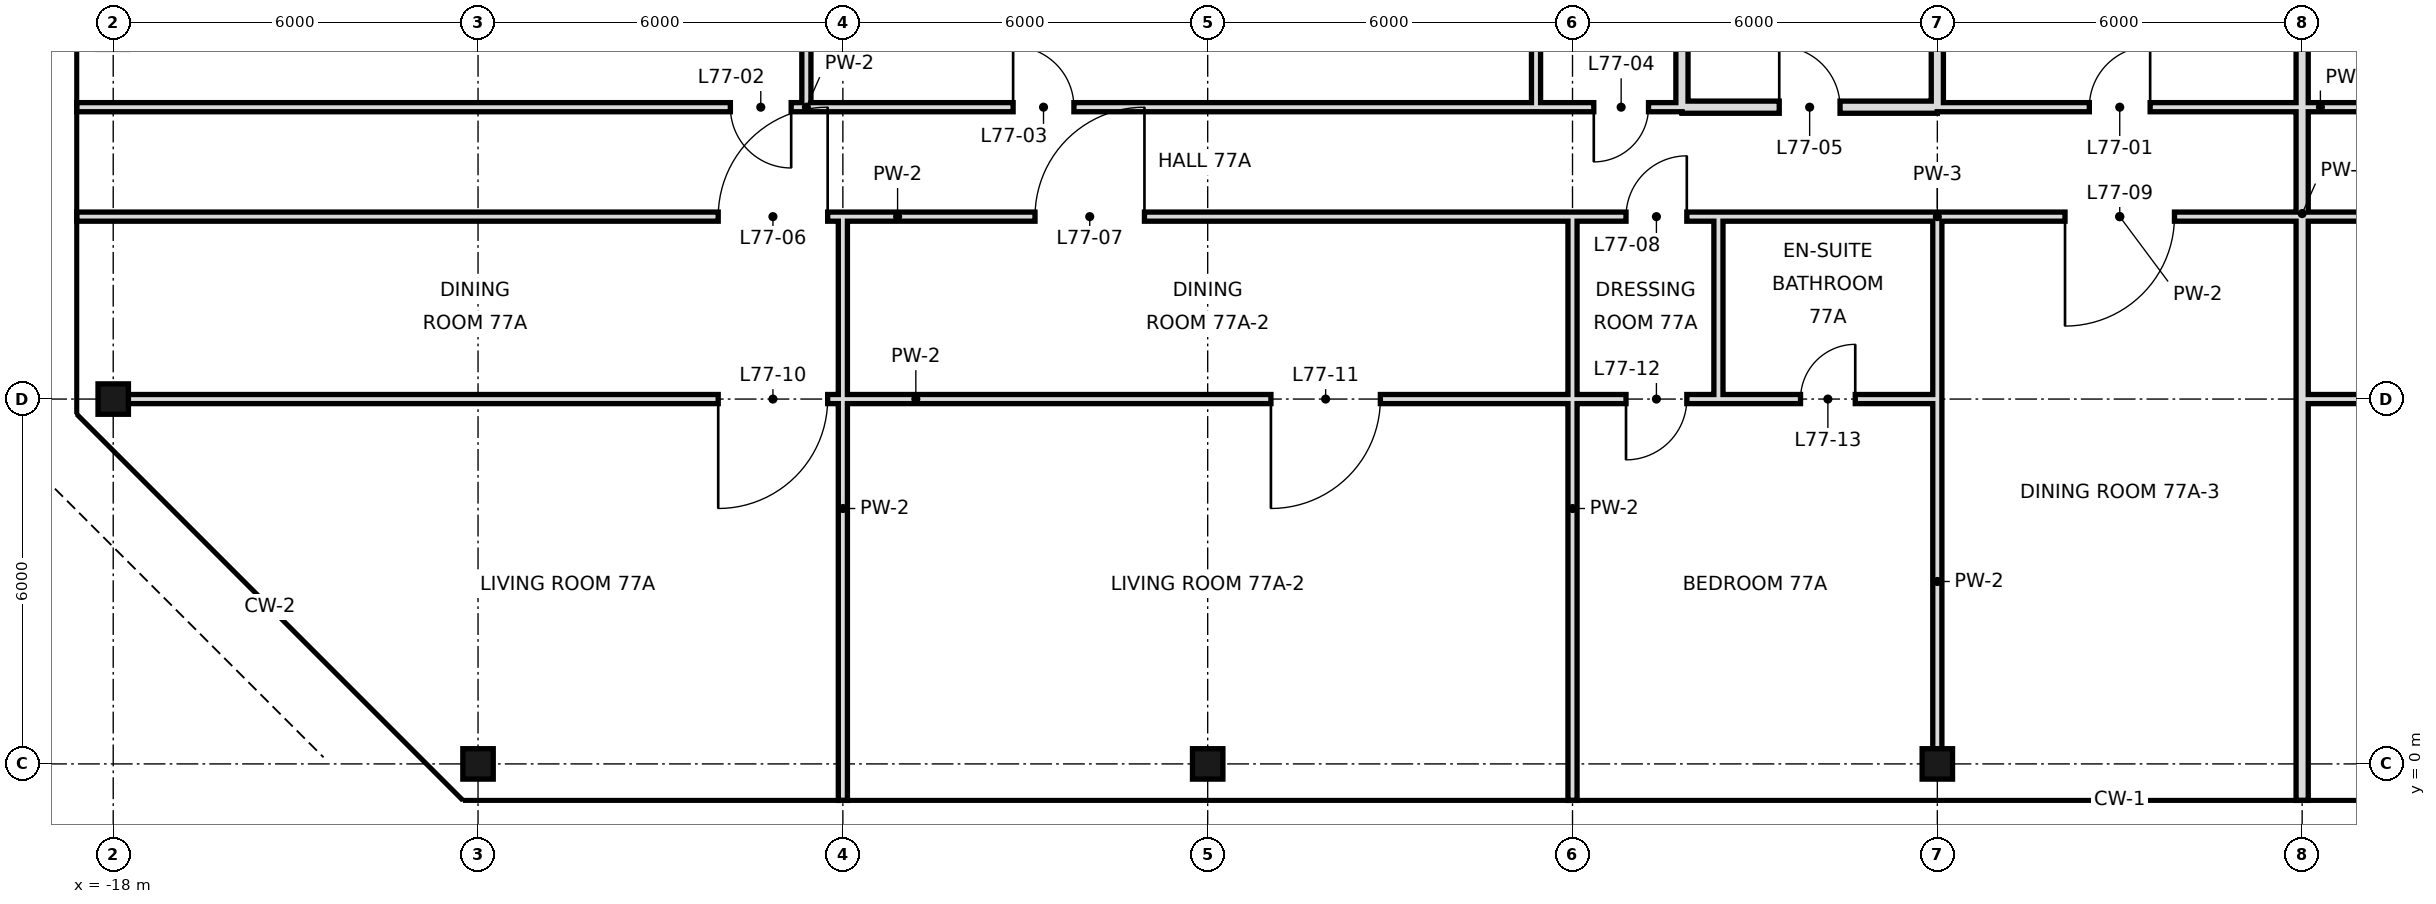
"""IFC4 building model, lengths in metres.
Left out: names, types, materials, properties, quantities, classifications, styles, units other than length and angle.
Written with IfcOpenShell. Run it as: python <this file> out.ifc"""

import sys

from ifc_helpers import new_model, si_unit, direction, frame, frame_2d, origin, origin_2d, place, context, subcontext, project, spatial, rectangle, hollow_rectangle, extrude, element, fill, save


model = new_model("IFC4")
c1 = context("Model", 3, precision=1e-05, world=origin(), true_north=direction((0.0, 1.0)))
c2 = subcontext(c1, "Body", "Model", "MODEL_VIEW")
j1 = project(units=[si_unit("LENGTHUNIT", "METRE"), si_unit("PLANEANGLEUNIT", "RADIAN")], contexts=[c1])
p1 = place(None, origin())
s1 = spatial("IfcSite", under=j1, at=p1, CompositionType="ELEMENT")
p2 = place(p1, origin())
s2 = spatial("IfcBuilding", under=s1, at=p2, CompositionType="ELEMENT")
p3 = place(p2, frame((0.0, 0.0, 323.2)))
s3 = spatial("IfcBuildingStorey", under=s2, at=p3, CompositionType="ELEMENT", Elevation=323.2)
for number, where, z_axis, x_axis in (
    (1, (-18.0, 6.0, 0.0), (0.0, 0.0, 1.0), (1.0, 0.0, 0.0)),
    (2, (-12.0, 0.0, 0.0), (0.0, 0.0, 1.0), (1.0, 0.0, 0.0)),
    (3, (0.0, 0.0, 0.0), (0.0, 0.0, 1.0), (1.0, 0.0, 0.0)),
    (4, (12.0, 0.0, 0.0), (0.0, 0.0, 1.0), (1.0, 0.0, 0.0)),
):
    element("IfcColumn", number, at=place(p3, frame(where, z_axis=z_axis, x_axis=x_axis)), inside=s3, PredefinedType="COLUMN", context=c2, shape_type="SweptSolid", body=[
        extrude(hollow_rectangle(XDim=0.5, YDim=0.5, WallThickness=0.025, at=origin_2d()), origin(), (0.0, 0.0, 1.0), 3.6),
    ])
p4 = place(p3, frame((-6.0, -0.6, 0.0), z_axis=(0.0, 0.0, 1.0), x_axis=(0.0, 1.0, 0.0)))
e5 = element("IfcWall", 5, at=p4, inside=s3, PredefinedType="PARTITIONING", context=c2, shape_type="SweptSolid", body=[
    extrude(rectangle(XDim=9.6, YDim=0.15, at=frame_2d((4.8, 0.0))), origin(), (0.0, 0.0, 1.0), 3.42),
])
p5 = place(p3, frame((-6.6, 10.8, 0.0), z_axis=(0.0, 0.0, 1.0), x_axis=(0.0, 1.0, 0.0)))
e6 = element("IfcWall", 6, at=p5, inside=s3, PredefinedType="PARTITIONING", context=c2, shape_type="SweptSolid", body=[
    extrude(rectangle(XDim=7.2, YDim=0.15, at=frame_2d((3.6, 0.0))), origin(), (0.0, 0.0, 1.0), 3.42),
])
p6 = place(p3, frame((12.0, 10.8, 0.0), z_axis=(0.0, 0.0, 1.0), x_axis=(0.0, 1.0, 0.0)))
e7 = element("IfcWall", 7, at=p6, inside=s3, PredefinedType="SOLIDWALL", context=c2, shape_type="SweptSolid", body=[
    extrude(rectangle(XDim=7.9, YDim=0.2, at=frame_2d((3.95, 0.0))), origin(), (0.0, 0.0, 1.0), 2.72),
])
p7 = place(p3, frame((12.0, 0.0, 0.0), z_axis=(0.0, 0.0, 1.0), x_axis=(0.0, 1.0, 0.0)))
e8 = element("IfcWall", 8, at=p7, inside=s3, PredefinedType="PARTITIONING", context=c2, shape_type="SweptSolid", body=[
    extrude(rectangle(XDim=6.0, YDim=0.15, at=frame_2d((3.0, 0.0))), origin(), (0.0, 0.0, 1.0), 2.72),
])
p8 = place(p3, frame((12.0, 6.0, 0.0), z_axis=(0.0, 0.0, 1.0), x_axis=(0.0, 1.0, 0.0)))
e9 = element("IfcWall", 9, at=p8, inside=s3, PredefinedType="PARTITIONING", context=c2, shape_type="SweptSolid", body=[
    extrude(rectangle(XDim=3.0, YDim=0.15, at=frame_2d((1.5, 0.0))), origin(), (0.0, 0.0, 1.0), 2.72),
])
p9 = place(p3, frame((18.0, -0.6, 0.0), z_axis=(0.0, 0.0, 1.0), x_axis=(0.0, 1.0, 0.0)))
e10 = element("IfcWall", 10, at=p9, inside=s3, PredefinedType="SOLIDWALL", context=c2, shape_type="SweptSolid", body=[
    extrude(rectangle(XDim=19.3, YDim=0.2, at=frame_2d((9.65, 0.0))), origin(), (0.0, 0.0, 1.0), 2.72),
])
p10 = place(p3, frame((5.4, 10.8, 0.0), z_axis=(0.0, 0.0, 1.0), x_axis=(0.0, 1.0, 0.0)))
e11 = element("IfcWall", 11, at=p10, inside=s3, PredefinedType="PARTITIONING", context=c2, shape_type="SweptSolid", body=[
    extrude(rectangle(XDim=7.9, YDim=0.15, at=frame_2d((3.95, 0.0))), origin(), (0.0, 0.0, 1.0), 3.42),
])
p11 = place(p3, frame((6.0, -0.6, 0.0), z_axis=(0.0, 0.0, 1.0), x_axis=(0.0, 1.0, 0.0)))
e12 = element("IfcWall", 12, at=p11, inside=s3, PredefinedType="PARTITIONING", context=c2, shape_type="SweptSolid", body=[
    extrude(rectangle(XDim=9.6, YDim=0.15, at=frame_2d((4.8, 0.0))), origin(), (0.0, 0.0, 1.0), 2.72),
])
p12 = place(p3, frame((7.8, 10.8, 0.0), z_axis=(0.0, 0.0, 1.0), x_axis=(0.0, 1.0, 0.0)))
e13 = element("IfcWall", 13, at=p12, inside=s3, PredefinedType="SOLIDWALL", context=c2, shape_type="SweptSolid", body=[
    extrude(rectangle(XDim=7.9, YDim=0.2, at=frame_2d((3.95, 0.0))), origin(), (0.0, 0.0, 1.0), 2.72),
])
p13 = place(p3, frame((8.4, 6.0, 0.0), z_axis=(0.0, 0.0, 1.0), x_axis=(0.0, 1.0, 0.0)))
e14 = element("IfcWall", 14, at=p13, inside=s3, PredefinedType="PARTITIONING", context=c2, shape_type="SweptSolid", body=[
    extrude(rectangle(XDim=3.0, YDim=0.15, at=frame_2d((1.5, 0.0))), origin(), (0.0, 0.0, 1.0), 3.42),
])
p14 = place(p3, frame((7.8, 10.8, 0.0), z_axis=(0.0, 0.0, 1.0), x_axis=(1.0, 0.0, 0.0)))
e15 = element("IfcWall", 15, at=p14, inside=s3, PredefinedType="SOLIDWALL", context=c2, shape_type="SweptSolid", body=[
    extrude(rectangle(XDim=4.2, YDim=0.2, at=frame_2d((2.1, 0.0))), origin(), (0.0, 0.0, 1.0), 2.72),
])
p15 = place(p14, frame((1.6, 0.0, 0.0)))
e16 = element("IfcOpeningElement", 16, at=p15, cuts=e15, PredefinedType="OPENING", context=c2, shape_type="SweptSolid", body=[
    extrude(rectangle(XDim=1.0, YDim=2.4, at=frame_2d((0.5, 1.2))), frame((0.0, 0.11, 0.0), z_axis=(0.0, -1.0, 0.0), x_axis=(1.0, 0.0, 0.0)), (0.0, 0.0, 1.0), 0.22),
])
p16 = place(p3, frame((-18.6, 10.8, 0.0), z_axis=(0.0, 0.0, 1.0), x_axis=(1.0, 0.0, 0.0)))
e17 = element("IfcWall", 17, at=p16, inside=s3, PredefinedType="PARTITIONING", context=c2, shape_type="SweptSolid", body=[
    extrude(rectangle(XDim=24.0, YDim=0.15, at=frame_2d((12.0, 0.0))), origin(), (0.0, 0.0, 1.0), 3.42),
])
p17 = place(p16, frame((10.75, 0.0, 0.0)))
e18 = element("IfcOpeningElement", 18, at=p17, cuts=e17, PredefinedType="OPENING", context=c2, shape_type="SweptSolid", body=[
    extrude(rectangle(XDim=1.0, YDim=2.4, at=frame_2d((0.5, 1.2))), frame((0.0, 0.085, 0.0), z_axis=(0.0, -1.0, 0.0), x_axis=(1.0, 0.0, 0.0)), (0.0, 0.0, 1.0), 0.17),
])
p18 = place(p16, frame((15.4, 0.0, 0.0)))
e19 = element("IfcOpeningElement", 19, at=p18, cuts=e17, PredefinedType="OPENING", context=c2, shape_type="SweptSolid", body=[
    extrude(rectangle(XDim=1.0, YDim=2.4, at=frame_2d((0.5, 1.2))), frame((0.0, 0.085, 0.0), z_axis=(0.0, -1.0, 0.0), x_axis=(1.0, 0.0, 0.0)), (0.0, 0.0, 1.0), 0.17),
])
p19 = place(p3, frame((12.0, 10.8, 0.0), z_axis=(0.0, 0.0, 1.0), x_axis=(1.0, 0.0, 0.0)))
e20 = element("IfcWall", 20, at=p19, inside=s3, PredefinedType="PARTITIONING", context=c2, shape_type="SweptSolid", body=[
    extrude(rectangle(XDim=12.6, YDim=0.15, at=frame_2d((6.3, 0.0))), origin(), (0.0, 0.0, 1.0), 3.42),
])
p20 = place(p19, frame((2.5, 0.0, 0.0)))
e21 = element("IfcOpeningElement", 21, at=p20, cuts=e20, PredefinedType="OPENING", context=c2, shape_type="SweptSolid", body=[
    extrude(rectangle(XDim=1.0, YDim=2.4, at=frame_2d((0.5, 1.2))), frame((0.0, 0.085, 0.0), z_axis=(0.0, -1.0, 0.0), x_axis=(1.0, 0.0, 0.0)), (0.0, 0.0, 1.0), 0.17),
])
p21 = place(p19, frame((9.82, 0.0, 0.0)))
e22 = element("IfcOpeningElement", 22, at=p21, cuts=e20, PredefinedType="OPENING", context=c2, shape_type="SweptSolid", body=[
    extrude(rectangle(XDim=1.0, YDim=2.4, at=frame_2d((0.5, 1.2))), frame((0.0, 0.085, 0.0), z_axis=(0.0, -1.0, 0.0), x_axis=(1.0, 0.0, 0.0)), (0.0, 0.0, 1.0), 0.17),
])
p22 = place(p3, frame((5.4, 10.8, 0.0), z_axis=(0.0, 0.0, 1.0), x_axis=(1.0, 0.0, 0.0)))
e23 = element("IfcWall", 23, at=p22, inside=s3, PredefinedType="PARTITIONING", context=c2, shape_type="SweptSolid", body=[
    extrude(rectangle(XDim=2.4, YDim=0.15, at=frame_2d((1.2, 0.0))), origin(), (0.0, 0.0, 1.0), 3.42),
])
p23 = place(p22, frame((0.95, 0.0, 0.0)))
e24 = element("IfcOpeningElement", 24, at=p23, cuts=e23, PredefinedType="OPENING", context=c2, shape_type="SweptSolid", body=[
    extrude(rectangle(XDim=0.9, YDim=2.4, at=frame_2d((0.45, 1.2))), frame((0.0, 0.085, 0.0), z_axis=(0.0, -1.0, 0.0), x_axis=(1.0, 0.0, 0.0)), (0.0, 0.0, 1.0), 0.17),
])
p24 = place(p3, frame((-18.0, 6.0, 0.0), z_axis=(0.0, 0.0, 1.0), x_axis=(1.0, 0.0, 0.0)))
e25 = element("IfcWall", 25, at=p24, inside=s3, PredefinedType="PARTITIONING", context=c2, shape_type="SweptSolid", body=[
    extrude(rectangle(XDim=26.4, YDim=0.15, at=frame_2d((13.2, 0.0))), origin(), (0.0, 0.0, 1.0), 2.72),
])
p25 = place(p24, frame((9.95, 0.0, 0.0)))
e26 = element("IfcOpeningElement", 26, at=p25, cuts=e25, PredefinedType="OPENING", context=c2, shape_type="SweptSolid", body=[
    extrude(rectangle(XDim=1.8, YDim=2.4, at=frame_2d((0.9, 1.2))), frame((0.0, 0.085, 0.0), z_axis=(0.0, -1.0, 0.0), x_axis=(1.0, 0.0, 0.0)), (0.0, 0.0, 1.0), 0.17),
])
p26 = place(p24, frame((19.04, 0.0, 0.0)))
e27 = element("IfcOpeningElement", 27, at=p26, cuts=e25, PredefinedType="OPENING", context=c2, shape_type="SweptSolid", body=[
    extrude(rectangle(XDim=1.8, YDim=2.4, at=frame_2d((0.9, 1.2))), frame((0.0, 0.085, 0.0), z_axis=(0.0, -1.0, 0.0), x_axis=(1.0, 0.0, 0.0)), (0.0, 0.0, 1.0), 0.17),
])
p27 = place(p24, frame((24.88, 0.0, 0.0)))
e28 = element("IfcOpeningElement", 28, at=p27, cuts=e25, PredefinedType="OPENING", context=c2, shape_type="SweptSolid", body=[
    extrude(rectangle(XDim=1.0, YDim=2.4, at=frame_2d((0.5, 1.2))), frame((0.0, 0.085, 0.0), z_axis=(0.0, -1.0, 0.0), x_axis=(1.0, 0.0, 0.0)), (0.0, 0.0, 1.0), 0.17),
])
p28 = place(p3, frame((8.4, 6.0, 0.0), z_axis=(0.0, 0.0, 1.0), x_axis=(1.0, 0.0, 0.0)))
e29 = element("IfcWall", 29, at=p28, inside=s3, PredefinedType="PARTITIONING", context=c2, shape_type="SweptSolid", body=[
    extrude(rectangle(XDim=3.6, YDim=0.15, at=frame_2d((1.8, 0.0))), origin(), (0.0, 0.0, 1.0), 2.97),
])
p29 = place(p28, frame((1.35, 0.0, 0.0)))
e30 = element("IfcOpeningElement", 30, at=p29, cuts=e29, PredefinedType="OPENING", context=c2, shape_type="SweptSolid", body=[
    extrude(rectangle(XDim=0.9, YDim=2.4, at=frame_2d((0.45, 1.2))), frame((0.0, 0.085, 0.0), z_axis=(0.0, -1.0, 0.0), x_axis=(1.0, 0.0, 0.0)), (0.0, 0.0, 1.0), 0.17),
])
p30 = place(p3, frame((18.0, 6.0, 0.0), z_axis=(0.0, 0.0, 1.0), x_axis=(1.0, 0.0, 0.0)))
e31 = element("IfcWall", 31, at=p30, inside=s3, PredefinedType="PARTITIONING", context=c2, shape_type="SweptSolid", body=[
    extrude(rectangle(XDim=8.4, YDim=0.15, at=frame_2d((4.2, 0.0))), origin(), (0.0, 0.0, 1.0), 2.97),
])
p31 = place(p30, frame((7.25, 0.0, 0.0)))
e32 = element("IfcOpeningElement", 32, at=p31, cuts=e31, PredefinedType="OPENING", context=c2, shape_type="SweptSolid", body=[
    extrude(rectangle(XDim=0.9, YDim=2.4, at=frame_2d((0.45, 1.2))), frame((0.0, 0.085, 0.0), z_axis=(0.0, -1.0, 0.0), x_axis=(1.0, 0.0, 0.0)), (0.0, 0.0, 1.0), 0.17),
])
p32 = place(p3, frame((-18.6, 9.0, 0.0), z_axis=(0.0, 0.0, 1.0), x_axis=(1.0, 0.0, 0.0)))
e33 = element("IfcWall", 33, at=p32, inside=s3, PredefinedType="PARTITIONING", context=c2, shape_type="SweptSolid", body=[
    extrude(rectangle(XDim=27.0, YDim=0.15, at=frame_2d((13.5, 0.0))), origin(), (0.0, 0.0, 1.0), 3.42),
])
p33 = place(p32, frame((10.55, 0.0, 0.0)))
e34 = element("IfcOpeningElement", 34, at=p33, cuts=e33, PredefinedType="OPENING", context=c2, shape_type="SweptSolid", body=[
    extrude(rectangle(XDim=1.8, YDim=2.4, at=frame_2d((0.9, 1.2))), frame((0.0, 0.085, 0.0), z_axis=(0.0, -1.0, 0.0), x_axis=(1.0, 0.0, 0.0)), (0.0, 0.0, 1.0), 0.17),
])
p34 = place(p32, frame((15.76, 0.0, 0.0)))
e35 = element("IfcOpeningElement", 35, at=p34, cuts=e33, PredefinedType="OPENING", context=c2, shape_type="SweptSolid", body=[
    extrude(rectangle(XDim=1.8, YDim=2.4, at=frame_2d((0.9, 1.2))), frame((0.0, 0.085, 0.0), z_axis=(0.0, -1.0, 0.0), x_axis=(1.0, 0.0, 0.0)), (0.0, 0.0, 1.0), 0.17),
])
p35 = place(p32, frame((25.48, 0.0, 0.0)))
e36 = element("IfcOpeningElement", 36, at=p35, cuts=e33, PredefinedType="OPENING", context=c2, shape_type="SweptSolid", body=[
    extrude(rectangle(XDim=1.0, YDim=2.4, at=frame_2d((0.5, 1.2))), frame((0.0, 0.085, 0.0), z_axis=(0.0, -1.0, 0.0), x_axis=(1.0, 0.0, 0.0)), (0.0, 0.0, 1.0), 0.17),
])
p36 = place(p3, frame((12.0, 9.0, 0.0), z_axis=(0.0, 0.0, 1.0), x_axis=(1.0, 0.0, 0.0)))
e37 = element("IfcWall", 37, at=p36, inside=s3, PredefinedType="PARTITIONING", context=c2, shape_type="SweptSolid", body=[
    extrude(rectangle(XDim=6.0, YDim=0.15, at=frame_2d((3.0, 0.0))), origin(), (0.0, 0.0, 1.0), 3.42),
])
p37 = place(p36, frame((2.1, 0.0, 0.0)))
e38 = element("IfcOpeningElement", 38, at=p37, cuts=e37, PredefinedType="OPENING", context=c2, shape_type="SweptSolid", body=[
    extrude(rectangle(XDim=1.8, YDim=2.4, at=frame_2d((0.9, 1.2))), frame((0.0, 0.085, 0.0), z_axis=(0.0, -1.0, 0.0), x_axis=(1.0, 0.0, 0.0)), (0.0, 0.0, 1.0), 0.17),
])
p38 = place(p3, frame((8.4, 9.0, 0.0), z_axis=(0.0, 0.0, 1.0), x_axis=(1.0, 0.0, 0.0)))
e39 = element("IfcWall", 39, at=p38, inside=s3, PredefinedType="PARTITIONING", context=c2, shape_type="SweptSolid", body=[
    extrude(rectangle(XDim=3.6, YDim=0.15, at=frame_2d((1.8, 0.0))), origin(), (0.0, 0.0, 1.0), 3.42),
])
p39 = place(p3, frame((18.0, 9.0, 0.0), z_axis=(0.0, 0.0, 1.0), x_axis=(1.0, 0.0, 0.0)))
e40 = element("IfcWall", 40, at=p39, inside=s3, PredefinedType="PARTITIONING", context=c2, shape_type="SweptSolid", body=[
    extrude(rectangle(XDim=8.4, YDim=0.15, at=frame_2d((4.2, 0.0))), origin(), (0.0, 0.0, 1.0), 3.42),
])
p40 = place(p20, frame((1.0, 0.0, 0.0), z_axis=(0.0, 0.0, 1.0), x_axis=(-1.0, 0.0, 0.0)))
e41 = element("IfcDoor", 41, at=p40, inside=s3, OperationType="SINGLE_SWING_LEFT", PredefinedType="DOOR", context=c2, shape_type="SweptSolid", body=[
    extrude(rectangle(XDim=1.0, YDim=2.4, at=frame_2d((0.5, 1.2))), frame((0.0, 0.025, 0.0), z_axis=(0.0, -1.0, 0.0), x_axis=(1.0, 0.0, 0.0)), (0.0, 0.0, 1.0), 0.05),
])
fill(e21, e41)
p41 = place(p17, origin())
e42 = element("IfcDoor", 42, at=p41, inside=s3, OperationType="SINGLE_SWING_RIGHT", PredefinedType="DOOR", context=c2, shape_type="SweptSolid", body=[
    extrude(rectangle(XDim=1.0, YDim=2.4, at=frame_2d((0.5, 1.2))), frame((0.0, 0.025, 0.0), z_axis=(0.0, -1.0, 0.0), x_axis=(1.0, 0.0, 0.0)), (0.0, 0.0, 1.0), 0.05),
])
fill(e18, e42)
p42 = place(p18, origin())
e43 = element("IfcDoor", 43, at=p42, inside=s3, OperationType="SINGLE_SWING_LEFT", PredefinedType="DOOR", context=c2, shape_type="SweptSolid", body=[
    extrude(rectangle(XDim=1.0, YDim=2.4, at=frame_2d((0.5, 1.2))), frame((0.0, 0.025, 0.0), z_axis=(0.0, -1.0, 0.0), x_axis=(1.0, 0.0, 0.0)), (0.0, 0.0, 1.0), 0.05),
])
fill(e19, e43)
p43 = place(p23, frame((0.9, 0.0, 0.0), z_axis=(0.0, 0.0, 1.0), x_axis=(-1.0, 0.0, 0.0)))
e44 = element("IfcDoor", 44, at=p43, inside=s3, OperationType="SINGLE_SWING_RIGHT", PredefinedType="DOOR", context=c2, shape_type="SweptSolid", body=[
    extrude(rectangle(XDim=0.9, YDim=2.4, at=frame_2d((0.45, 1.2))), frame((0.0, 0.025, 0.0), z_axis=(0.0, -1.0, 0.0), x_axis=(1.0, 0.0, 0.0)), (0.0, 0.0, 1.0), 0.05),
])
fill(e24, e44)
p44 = place(p15, origin())
e45 = element("IfcDoor", 45, at=p44, inside=s3, OperationType="SINGLE_SWING_LEFT", PredefinedType="DOOR", context=c2, shape_type="SweptSolid", body=[
    extrude(rectangle(XDim=1.0, YDim=2.4, at=frame_2d((0.5, 1.2))), frame((0.0, 0.025, 0.0), z_axis=(0.0, -1.0, 0.0), x_axis=(1.0, 0.0, 0.0)), (0.0, 0.0, 1.0), 0.05),
])
fill(e16, e45)
p45 = place(p33, frame((1.8, 0.0, 0.0), z_axis=(0.0, 0.0, 1.0), x_axis=(-1.0, 0.0, 0.0)))
e46 = element("IfcDoor", 46, at=p45, inside=s3, OperationType="SINGLE_SWING_LEFT", PredefinedType="DOOR", context=c2, shape_type="SweptSolid", body=[
    extrude(rectangle(XDim=1.8, YDim=2.4, at=frame_2d((0.9, 1.2))), frame((0.0, 0.025, 0.0), z_axis=(0.0, -1.0, 0.0), x_axis=(1.0, 0.0, 0.0)), (0.0, 0.0, 1.0), 0.05),
])
fill(e34, e46)
p46 = place(p34, frame((1.8, 0.0, 0.0), z_axis=(0.0, 0.0, 1.0), x_axis=(-1.0, 0.0, 0.0)))
e47 = element("IfcDoor", 47, at=p46, inside=s3, OperationType="SINGLE_SWING_LEFT", PredefinedType="DOOR", context=c2, shape_type="SweptSolid", body=[
    extrude(rectangle(XDim=1.8, YDim=2.4, at=frame_2d((0.9, 1.2))), frame((0.0, 0.025, 0.0), z_axis=(0.0, -1.0, 0.0), x_axis=(1.0, 0.0, 0.0)), (0.0, 0.0, 1.0), 0.05),
])
fill(e35, e47)
p47 = place(p35, frame((1.0, 0.0, 0.0), z_axis=(0.0, 0.0, 1.0), x_axis=(-1.0, 0.0, 0.0)))
e48 = element("IfcDoor", 48, at=p47, inside=s3, OperationType="SINGLE_SWING_LEFT", PredefinedType="DOOR", context=c2, shape_type="SweptSolid", body=[
    extrude(rectangle(XDim=1.0, YDim=2.4, at=frame_2d((0.5, 1.2))), frame((0.0, 0.025, 0.0), z_axis=(0.0, -1.0, 0.0), x_axis=(1.0, 0.0, 0.0)), (0.0, 0.0, 1.0), 0.05),
])
fill(e36, e48)
p48 = place(p37, frame((1.8, 0.0, 0.0), z_axis=(0.0, 0.0, 1.0), x_axis=(-1.0, 0.0, 0.0)))
e49 = element("IfcDoor", 49, at=p48, inside=s3, OperationType="SINGLE_SWING_RIGHT", PredefinedType="DOOR", context=c2, shape_type="SweptSolid", body=[
    extrude(rectangle(XDim=1.8, YDim=2.4, at=frame_2d((0.9, 1.2))), frame((0.0, 0.025, 0.0), z_axis=(0.0, -1.0, 0.0), x_axis=(1.0, 0.0, 0.0)), (0.0, 0.0, 1.0), 0.05),
])
fill(e38, e49)
p49 = place(p25, frame((1.8, 0.0, 0.0), z_axis=(0.0, 0.0, 1.0), x_axis=(-1.0, 0.0, 0.0)))
e50 = element("IfcDoor", 50, at=p49, inside=s3, OperationType="SINGLE_SWING_RIGHT", PredefinedType="DOOR", context=c2, shape_type="SweptSolid", body=[
    extrude(rectangle(XDim=1.8, YDim=2.4, at=frame_2d((0.9, 1.2))), frame((0.0, 0.025, 0.0), z_axis=(0.0, -1.0, 0.0), x_axis=(1.0, 0.0, 0.0)), (0.0, 0.0, 1.0), 0.05),
])
fill(e26, e50)
p50 = place(p26, frame((1.8, 0.0, 0.0), z_axis=(0.0, 0.0, 1.0), x_axis=(-1.0, 0.0, 0.0)))
e51 = element("IfcDoor", 51, at=p50, inside=s3, OperationType="SINGLE_SWING_RIGHT", PredefinedType="DOOR", context=c2, shape_type="SweptSolid", body=[
    extrude(rectangle(XDim=1.8, YDim=2.4, at=frame_2d((0.9, 1.2))), frame((0.0, 0.025, 0.0), z_axis=(0.0, -1.0, 0.0), x_axis=(1.0, 0.0, 0.0)), (0.0, 0.0, 1.0), 0.05),
])
fill(e27, e51)
p51 = place(p27, frame((1.0, 0.0, 0.0), z_axis=(0.0, 0.0, 1.0), x_axis=(-1.0, 0.0, 0.0)))
e52 = element("IfcDoor", 52, at=p51, inside=s3, OperationType="SINGLE_SWING_RIGHT", PredefinedType="DOOR", context=c2, shape_type="SweptSolid", body=[
    extrude(rectangle(XDim=1.0, YDim=2.4, at=frame_2d((0.5, 1.2))), frame((0.0, 0.025, 0.0), z_axis=(0.0, -1.0, 0.0), x_axis=(1.0, 0.0, 0.0)), (0.0, 0.0, 1.0), 0.05),
])
fill(e28, e52)
p52 = place(p29, frame((0.9, 0.0, 0.0), z_axis=(0.0, 0.0, 1.0), x_axis=(-1.0, 0.0, 0.0)))
e53 = element("IfcDoor", 53, at=p52, inside=s3, OperationType="SINGLE_SWING_LEFT", PredefinedType="DOOR", context=c2, shape_type="SweptSolid", body=[
    extrude(rectangle(XDim=0.9, YDim=2.4, at=frame_2d((0.45, 1.2))), frame((0.0, 0.025, 0.0), z_axis=(0.0, -1.0, 0.0), x_axis=(1.0, 0.0, 0.0)), (0.0, 0.0, 1.0), 0.05),
])
fill(e30, e53)
save(model, sys.argv[1])
